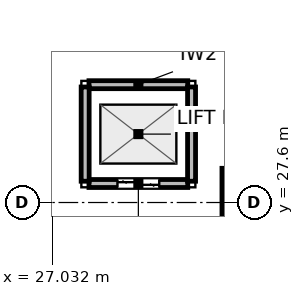
"""IFC4 building model, lengths in metres.
Left out: names, types, materials, properties, quantities, classifications, styles, units other than length and angle.
Written with IfcOpenShell. Run it as: python <this file> out.ifc"""

import sys

from ifc_helpers import new_model, si_unit, direction, frame, frame_2d, origin, origin_2d, place, context, subcontext, project, spatial, rectangle, extrude, element, fill, save


model = new_model("IFC4")
c1 = context("Model", 3, precision=1e-05, world=origin(), true_north=direction((0.0, 1.0)))
c2 = subcontext(c1, "Body", "Model", "MODEL_VIEW")
j1 = project(units=[si_unit("LENGTHUNIT", "METRE"), si_unit("PLANEANGLEUNIT", "RADIAN")], contexts=[c1])
p1 = place(None, origin())
s1 = spatial("IfcSite", under=j1, at=p1, CompositionType="ELEMENT")
p2 = place(p1, origin())
s2 = spatial("IfcBuilding", under=s1, at=p2, CompositionType="ELEMENT")
p3 = place(p2, frame((0.0, 0.0, -9.0)))
s3 = spatial("IfcBuildingStorey", under=s2, at=p3, CompositionType="ELEMENT", Elevation=-9.0)
p4 = place(p3, frame((32.4, 27.6, 0.0), z_axis=(0.0, 0.0, 1.0), x_axis=(1.0, 0.0, 0.0)))
e1 = element("IfcColumn", 1, at=p4, inside=s3, PredefinedType="COLUMN", context=c2, shape_type="SweptSolid", body=[
    extrude(rectangle(XDim=1.8, YDim=1.8, at=origin_2d()), origin(), (0.0, 0.0, 1.0), 4.5),
])
p5 = place(p3, frame((28.0, 28.1, 0.0), z_axis=(0.0, 0.0, 1.0), x_axis=(1.0, 0.0, 0.0)))
e2 = element("IfcWall", 2, at=p5, inside=s3, PredefinedType="PARTITIONING", context=c2, shape_type="SweptSolid", body=[
    extrude(rectangle(XDim=2.6, YDim=0.21, at=frame_2d((1.3, 0.0))), origin(), (0.0, 0.0, 1.0), 4.18),
])
p6 = place(p5, frame((0.75, 0.0, 0.0)))
e3 = element("IfcOpeningElement", 3, at=p6, cuts=e2, PredefinedType="OPENING", context=c2, shape_type="SweptSolid", body=[
    extrude(rectangle(XDim=1.1, YDim=2.04, at=frame_2d((0.55, 1.02))), frame((0.0, 0.115, 0.0), z_axis=(0.0, -1.0, 0.0), x_axis=(1.0, 0.0, 0.0)), (0.0, 0.0, 1.0), 0.23),
])
p7 = place(p3, frame((28.0, 30.7, 0.0), z_axis=(0.0, 0.0, 1.0), x_axis=(1.0, 0.0, 0.0)))
e4 = element("IfcWall", 4, at=p7, inside=s3, PredefinedType="PARTITIONING", context=c2, shape_type="SweptSolid", body=[
    extrude(rectangle(XDim=2.6, YDim=0.21, at=frame_2d((1.3, 0.0))), origin(), (0.0, 0.0, 1.0), 4.18),
])
for number, where, z_axis, x_axis in (
    (5, (27.9, 28.16, 0.0), (0.0, 0.0, 1.0), (0.0, 1.0, 0.0)),
    (6, (30.7, 28.16, 0.0), (0.0, 0.0, 1.0), (0.0, 1.0, 0.0)),
):
    element("IfcWall", number, at=place(p3, frame(where, z_axis=z_axis, x_axis=x_axis)), inside=s3, PredefinedType="PARTITIONING", context=c2, shape_type="SweptSolid", body=[
        extrude(rectangle(XDim=2.48, YDim=0.21, at=frame_2d((1.24, 0.0))), origin(), (0.0, 0.0, 1.0), 4.18),
    ])
p8 = place(p6, origin())
e7 = element("IfcDoor", 7, at=p8, inside=s3, OperationType="DOUBLE_DOOR_SLIDING", PredefinedType="DOOR", context=c2, shape_type="SweptSolid", body=[
    extrude(rectangle(XDim=1.1, YDim=2.04, at=frame_2d((0.55, 1.02))), frame((0.0, 0.025, 0.0), z_axis=(0.0, -1.0, 0.0), x_axis=(1.0, 0.0, 0.0)), (0.0, 0.0, 1.0), 0.05),
])
fill(e3, e7)
save(model, sys.argv[1])
